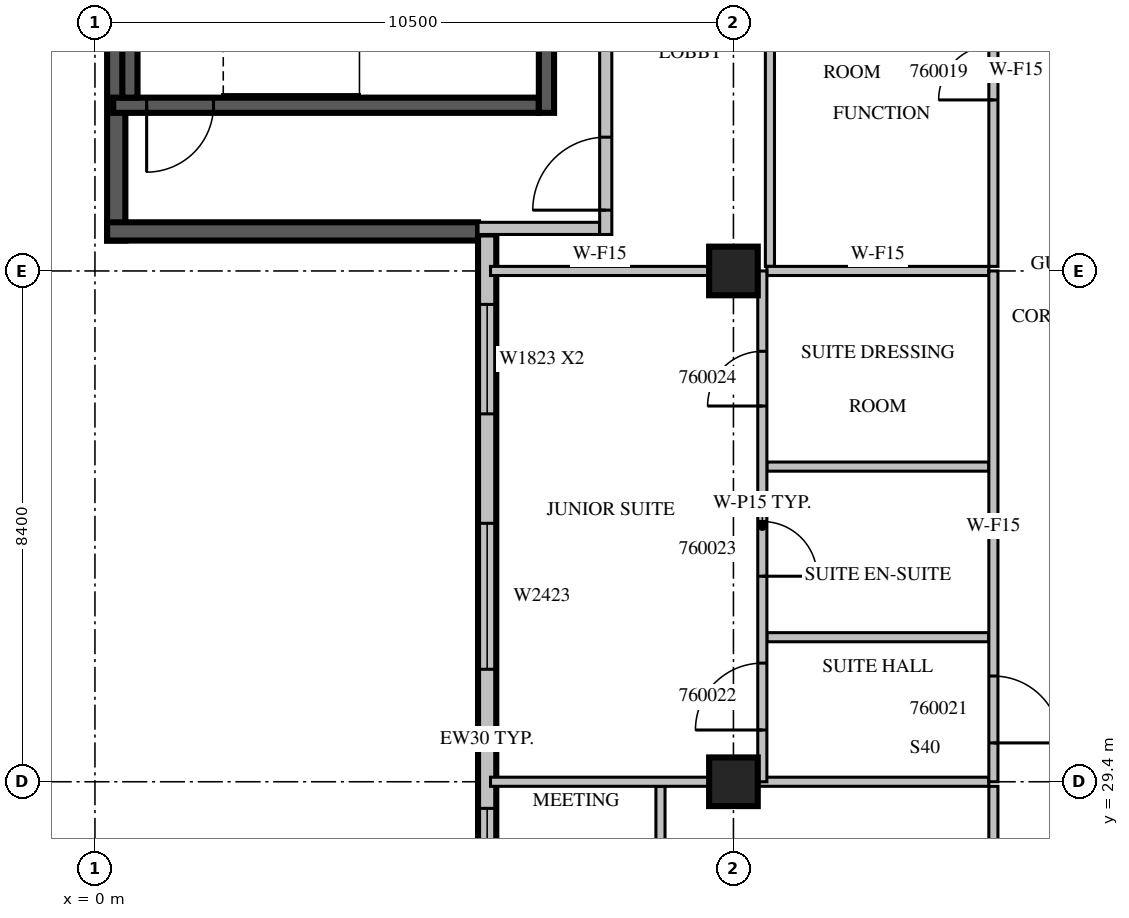
"""IFC4 building model, lengths in metres.
Left out: names, types, materials, properties, quantities, classifications, styles, units other than length and angle.
Written with IfcOpenShell. Run it as: python <this file> out.ifc"""

import sys

from ifc_helpers import new_model, si_unit, direction, frame, frame_2d, origin, origin_2d, place, context, subcontext, project, spatial, rectangle, extrude, source, transform, mapped, element, fill, save


model = new_model("IFC4")
c1 = context("Model", 3, precision=1e-05, world=origin(), true_north=direction((0.0, 1.0)))
c2 = subcontext(c1, "Body", "Model", "MODEL_VIEW")
j1 = project(units=[si_unit("LENGTHUNIT", "METRE"), si_unit("PLANEANGLEUNIT", "RADIAN")], contexts=[c1])
p1 = place(None, origin())
s1 = spatial("IfcSite", under=j1, at=p1, CompositionType="ELEMENT")
p2 = place(p1, origin())
s2 = spatial("IfcBuilding", under=s1, at=p2, CompositionType="ELEMENT")
p3 = place(p2, frame((0.0, 0.0, 261.4)))
s3 = spatial("IfcBuildingStorey", under=s2, at=p3, CompositionType="ELEMENT", Elevation=261.4)
m1 = source(origin(), c2, "Body", "SweptSolid", [
    extrude(rectangle(XDim=0.8, YDim=0.8, at=origin_2d()), origin(), (0.0, 0.0, 1.0), 3.8),
])
for number, where, z_axis, x_axis in (
    (1, (10.5, 29.4, 0.0), (0.0, 0.0, 1.0), (1.0, 0.0, 0.0)),
    (2, (10.5, 37.8, 0.0), (0.0, 0.0, 1.0), (1.0, 0.0, 0.0)),
):
    element("IfcColumn", number, at=place(p3, frame(where, z_axis=z_axis, x_axis=x_axis)), inside=s3, PredefinedType="COLUMN", context=c2, shape_type="MappedRepresentation", body=[
        mapped(m1, transform((0.0, 0.0, 0.0), scale=1.0)),
    ])
m2 = source(origin(), c2, "Body", "SweptSolid", [
    extrude(rectangle(XDim=5.65, YDim=0.3, at=frame_2d((2.825, 0.0))), origin(), (0.0, 0.0, 1.0), 3.4),
])
p4 = place(p3, frame((0.35, 43.95, 0.0), z_axis=(0.0, 0.0, 1.0), x_axis=(0.0, -1.0, 0.0)))
e3 = element("IfcWall", 3, at=p4, inside=s3, PredefinedType="SOLIDWALL", context=c2, shape_type="MappedRepresentation", body=[
    mapped(m2, transform((0.0, 0.0, 0.0), scale=1.0)),
])
m3 = source(origin(), c2, "Body", "SweptSolid", [
    extrude(rectangle(XDim=6.1, YDim=0.3, at=frame_2d((3.05, 0.0))), origin(), (0.0, 0.0, 1.0), 3.4),
])
p5 = place(p3, frame((0.2, 38.45, 0.0), z_axis=(0.0, 0.0, 1.0), x_axis=(1.0, 0.0, 0.0)))
e4 = element("IfcWall", 4, at=p5, inside=s3, PredefinedType="SOLIDWALL", context=c2, shape_type="MappedRepresentation", body=[
    mapped(m3, transform((0.0, 0.0, 0.0), scale=1.0)),
])
m4 = source(origin(), c2, "Body", "SweptSolid", [
    extrude(rectangle(XDim=16.6, YDim=0.3, at=frame_2d((8.3, 0.0))), origin(), (0.0, 0.0, 1.0), 3.4),
])
p6 = place(p3, frame((6.45, 38.4, 0.0), z_axis=(0.0, 0.0, 1.0), x_axis=(0.0, -1.0, 0.0)))
e5 = element("IfcWall", 5, at=p6, inside=s3, PredefinedType="STANDARD", context=c2, shape_type="MappedRepresentation", body=[
    mapped(m4, transform((0.0, 0.0, 0.0), scale=1.0)),
])
m5 = source(origin(), c2, "Body", "SweptSolid", [
    extrude(rectangle(XDim=1.8, YDim=2.3, at=frame_2d((0.9, 1.15))), frame((0.0, 0.16, 0.0), z_axis=(0.0, -1.0, 0.0), x_axis=(1.0, 0.0, 0.0)), (0.0, 0.0, 1.0), 0.32),
])
p7 = place(p6, frame((1.15, 0.0, 0.6)))
e6 = element("IfcOpeningElement", 6, at=p7, cuts=e5, PredefinedType="OPENING", context=c2, shape_type="MappedRepresentation", body=[
    mapped(m5, transform((0.0, 0.0, 0.0), scale=1.0)),
])
m6 = source(origin(), c2, "Body", "SweptSolid", [
    extrude(rectangle(XDim=2.4, YDim=2.3, at=frame_2d((1.2, 1.15))), frame((0.0, 0.16, 0.0), z_axis=(0.0, -1.0, 0.0), x_axis=(1.0, 0.0, 0.0)), (0.0, 0.0, 1.0), 0.32),
])
p8 = place(p6, frame((4.75, 0.0, 0.6)))
e7 = element("IfcOpeningElement", 7, at=p8, cuts=e5, PredefinedType="OPENING", context=c2, shape_type="MappedRepresentation", body=[
    mapped(m6, transform((0.0, 0.0, 0.0), scale=1.0)),
])
p9 = place(p6, frame((9.438, 0.0, 0.6)))
e8 = element("IfcOpeningElement", 8, at=p9, cuts=e5, PredefinedType="OPENING", context=c2, shape_type="MappedRepresentation", body=[
    mapped(m5, transform((0.0, 0.0, 0.0), scale=1.0)),
])
m7 = source(origin(), c2, "Body", "SweptSolid", [
    extrude(rectangle(XDim=3.0, YDim=2.3, at=frame_2d((1.5, 1.15))), frame((0.0, 0.16, 0.0), z_axis=(0.0, -1.0, 0.0), x_axis=(1.0, 0.0, 0.0)), (0.0, 0.0, 1.0), 0.32),
])
p10 = place(p6, frame((12.7, 0.0, 0.6)))
e9 = element("IfcOpeningElement", 9, at=p10, cuts=e5, PredefinedType="OPENING", context=c2, shape_type="MappedRepresentation", body=[
    mapped(m7, transform((0.0, 0.0, 0.0), scale=1.0)),
])
m8 = source(origin(), c2, "Body", "SweptSolid", [
    extrude(rectangle(XDim=7.0, YDim=0.25, at=frame_2d((3.5, 0.0))), origin(), (0.0, 0.0, 1.0), 3.4),
])
p11 = place(p3, frame((0.3, 40.525, 0.0), z_axis=(0.0, 0.0, 1.0), x_axis=(1.0, 0.0, 0.0)))
e10 = element("IfcWall", 10, at=p11, inside=s3, PredefinedType="SOLIDWALL", context=c2, shape_type="MappedRepresentation", body=[
    mapped(m8, transform((0.0, 0.0, 0.0), scale=1.0)),
])
m9 = source(origin(), c2, "Body", "SweptSolid", [
    extrude(rectangle(XDim=1.1, YDim=2.1, at=frame_2d((0.55, 1.05))), frame((0.0, 0.135, 0.0), z_axis=(0.0, -1.0, 0.0), x_axis=(1.0, 0.0, 0.0)), (0.0, 0.0, 1.0), 0.27),
])
p12 = place(p11, frame((0.55, 0.0, 0.0)))
e11 = element("IfcOpeningElement", 11, at=p12, cuts=e10, PredefinedType="OPENING", context=c2, shape_type="MappedRepresentation", body=[
    mapped(m9, transform((0.0, 0.0, 0.0), scale=1.0)),
])
m10 = source(origin(), c2, "Body", "SweptSolid", [
    extrude(rectangle(XDim=3.45, YDim=0.25, at=frame_2d((1.725, 0.0))), origin(), (0.0, 0.0, 1.0), 3.4),
])
p13 = place(p3, frame((7.425, 40.4, 0.0), z_axis=(0.0, 0.0, 1.0), x_axis=(0.0, 1.0, 0.0)))
e12 = element("IfcWall", 12, at=p13, inside=s3, PredefinedType="SOLIDWALL", context=c2, shape_type="MappedRepresentation", body=[
    mapped(m10, transform((0.0, 0.0, 0.0), scale=1.0)),
])
m11 = source(origin(), c2, "Body", "SweptSolid", [
    extrude(rectangle(XDim=2.95, YDim=0.25, at=frame_2d((1.475, 0.0))), origin(), (0.0, 0.0, 1.0), 3.4),
])
p14 = place(p3, frame((0.575, 40.65, 0.0), z_axis=(0.0, 0.0, 1.0), x_axis=(0.0, 1.0, 0.0)))
e13 = element("IfcWall", 13, at=p14, inside=s3, PredefinedType="SOLIDWALL", context=c2, shape_type="MappedRepresentation", body=[
    mapped(m11, transform((0.0, 0.0, 0.0), scale=1.0)),
])
m12 = source(origin(), c2, "Body", "SweptSolid", [
    extrude(rectangle(XDim=2.0, YDim=0.2, at=frame_2d((1.0, 0.0))), origin(), (0.0, 0.0, 1.0), 3.4),
])
p15 = place(p3, frame((6.3, 38.5, 0.0), z_axis=(0.0, 0.0, 1.0), x_axis=(1.0, 0.0, 0.0)))
e14 = element("IfcWall", 14, at=p15, inside=s3, PredefinedType="PARTITIONING", context=c2, shape_type="MappedRepresentation", body=[
    mapped(m12, transform((0.0, 0.0, 0.0), scale=1.0)),
])
m13 = source(origin(), c2, "Body", "SweptSolid", [
    extrude(rectangle(XDim=5.45, YDim=0.2, at=frame_2d((2.725, 0.0))), origin(), (0.0, 0.0, 1.0), 3.4),
])
p16 = place(p3, frame((8.4, 38.4, 0.0), z_axis=(0.0, 0.0, 1.0), x_axis=(0.0, 1.0, 0.0)))
e15 = element("IfcWall", 15, at=p16, inside=s3, PredefinedType="PARTITIONING", context=c2, shape_type="MappedRepresentation", body=[
    mapped(m13, transform((0.0, 0.0, 0.0), scale=1.0)),
])
m14 = source(origin(), c2, "Body", "SweptSolid", [
    extrude(rectangle(XDim=1.2, YDim=2.1, at=frame_2d((0.6, 1.05))), frame((0.0, 0.11, 0.0), z_axis=(0.0, -1.0, 0.0), x_axis=(1.0, 0.0, 0.0)), (0.0, 0.0, 1.0), 0.22),
])
p17 = place(p16, frame((0.4, 0.0, 0.0)))
e16 = element("IfcOpeningElement", 16, at=p17, cuts=e15, PredefinedType="OPENING", context=c2, shape_type="MappedRepresentation", body=[
    mapped(m14, transform((0.0, 0.0, 0.0), scale=1.0)),
])
m15 = source(origin(), c2, "Body", "SweptSolid", [
    extrude(rectangle(XDim=0.9, YDim=2.1, at=frame_2d((0.45, 1.05))), frame((0.0, 0.11, 0.0), z_axis=(0.0, -1.0, 0.0), x_axis=(1.0, 0.0, 0.0)), (0.0, 0.0, 1.0), 0.22),
])
p18 = place(p16, frame((3.25, 0.0, 0.0)))
e17 = element("IfcOpeningElement", 17, at=p18, cuts=e15, PredefinedType="OPENING", context=c2, shape_type="MappedRepresentation", body=[
    mapped(m15, transform((0.0, 0.0, 0.0), scale=1.0)),
])
m16 = source(origin(), c2, "Body", "SweptSolid", [
    extrude(rectangle(XDim=3.25, YDim=0.15, at=frame_2d((1.625, 0.0))), origin(), (0.0, 0.0, 1.0), 3.4),
])
for number, where, z_axis, x_axis in (
    (18, (9.3, 26.075, 0.0), (0.0, 0.0, 1.0), (0.0, 1.0, 0.0)),
    (19, (14.775, 26.075, 0.0), (0.0, 0.0, 1.0), (0.0, 1.0, 0.0)),
):
    element("IfcWall", number, at=place(p3, frame(where, z_axis=z_axis, x_axis=x_axis)), inside=s3, PredefinedType="PARTITIONING", context=c2, shape_type="MappedRepresentation", body=[
        mapped(m16, transform((0.0, 0.0, 0.0), scale=1.0)),
    ])
m17 = source(origin(), c2, "Body", "SweptSolid", [
    extrude(rectangle(XDim=3.596, YDim=0.15, at=frame_2d((1.798, 0.0))), origin(), (0.0, 0.0, 1.0), 3.4),
])
p19 = place(p3, frame((10.101, 29.4, 0.0), z_axis=(0.0, 0.0, 1.0), x_axis=(-1.0, 0.0, 0.0)))
e20 = element("IfcWall", 20, at=p19, inside=s3, PredefinedType="PARTITIONING", context=c2, shape_type="MappedRepresentation", body=[
    mapped(m17, transform((0.0, 0.0, 0.0), scale=1.0)),
])
m18 = source(origin(), c2, "Body", "SweptSolid", [
    extrude(rectangle(XDim=3.801, YDim=0.15, at=frame_2d((1.901, 0.0))), origin(), (0.0, 0.0, 1.0), 3.4),
])
p20 = place(p3, frame((14.7, 29.4, 0.0), z_axis=(0.0, 0.0, 1.0), x_axis=(-1.0, 0.0, 0.0)))
e21 = element("IfcWall", 21, at=p20, inside=s3, PredefinedType="PARTITIONING", context=c2, shape_type="MappedRepresentation", body=[
    mapped(m18, transform((0.0, 0.0, 0.0), scale=1.0)),
])
m19 = source(origin(), c2, "Body", "SweptSolid", [
    extrude(rectangle(XDim=6.45, YDim=0.15, at=frame_2d((3.225, 0.0))), origin(), (0.0, 0.0, 1.0), 3.4),
])
p21 = place(p3, frame((11.1, 44.325, 0.0), z_axis=(0.0, 0.0, 1.0), x_axis=(0.0, -1.0, 0.0)))
e22 = element("IfcWall", 22, at=p21, inside=s3, PredefinedType="PARTITIONING", context=c2, shape_type="MappedRepresentation", body=[
    mapped(m19, transform((0.0, 0.0, 0.0), scale=1.0)),
])
p22 = place(p3, frame((14.775, 37.875, 0.0), z_axis=(0.0, 0.0, 1.0), x_axis=(0.0, 1.0, 0.0)))
e23 = element("IfcWall", 23, at=p22, inside=s3, PredefinedType="PARTITIONING", context=c2, shape_type="MappedRepresentation", body=[
    mapped(m19, transform((0.0, 0.0, 0.0), scale=1.0)),
])
m20 = source(origin(), c2, "Body", "SweptSolid", [
    extrude(rectangle(XDim=0.9, YDim=2.1, at=frame_2d((0.45, 1.05))), frame((0.0, 0.085, 0.0), z_axis=(0.0, -1.0, 0.0), x_axis=(1.0, 0.0, 0.0)), (0.0, 0.0, 1.0), 0.17),
])
p23 = place(p22, frame((2.737, 0.0, 0.0)))
e24 = element("IfcOpeningElement", 24, at=p23, cuts=e23, PredefinedType="OPENING", context=c2, shape_type="MappedRepresentation", body=[
    mapped(m20, transform((0.0, 0.0, 0.0), scale=1.0)),
])
m21 = source(origin(), c2, "Body", "SweptSolid", [
    extrude(rectangle(XDim=3.65, YDim=0.15, at=frame_2d((1.825, 0.0))), origin(), (0.0, 0.0, 1.0), 3.4),
])
for number, where, z_axis, x_axis in (
    (25, (14.7, 31.777, 0.0), (0.0, 0.0, 1.0), (-1.0, 0.0, 0.0)),
    (26, (14.7, 34.583, 0.0), (0.0, 0.0, 1.0), (-1.0, 0.0, 0.0)),
):
    element("IfcWall", number, at=place(p3, frame(where, z_axis=z_axis, x_axis=x_axis)), inside=s3, PredefinedType="PARTITIONING", context=c2, shape_type="MappedRepresentation", body=[
        mapped(m21, transform((0.0, 0.0, 0.0), scale=1.0)),
    ])
p24 = place(p3, frame((10.101, 37.8, 0.0), z_axis=(0.0, 0.0, 1.0), x_axis=(-1.0, 0.0, 0.0)))
e27 = element("IfcWall", 27, at=p24, inside=s3, PredefinedType="PARTITIONING", context=c2, shape_type="MappedRepresentation", body=[
    mapped(m17, transform((0.0, 0.0, 0.0), scale=1.0)),
])
p25 = place(p3, frame((14.7, 37.8, 0.0), z_axis=(0.0, 0.0, 1.0), x_axis=(-1.0, 0.0, 0.0)))
e28 = element("IfcWall", 28, at=p25, inside=s3, PredefinedType="PARTITIONING", context=c2, shape_type="MappedRepresentation", body=[
    mapped(m21, transform((0.0, 0.0, 0.0), scale=1.0)),
])
m22 = source(origin(), c2, "Body", "SweptSolid", [
    extrude(rectangle(XDim=8.4, YDim=0.15, at=frame_2d((4.2, 0.0))), origin(), (0.0, 0.0, 1.0), 3.4),
])
p26 = place(p3, frame((10.975, 29.4, 0.0), z_axis=(0.0, 0.0, 1.0), x_axis=(0.0, 1.0, 0.0)))
e29 = element("IfcWall", 29, at=p26, inside=s3, PredefinedType="PARTITIONING", context=c2, shape_type="MappedRepresentation", body=[
    mapped(m22, transform((0.0, 0.0, 0.0), scale=1.0)),
])
m23 = source(origin(), c2, "Body", "SweptSolid", [
    extrude(rectangle(XDim=1.1, YDim=2.1, at=frame_2d((0.55, 1.05))), frame((0.0, 0.085, 0.0), z_axis=(0.0, -1.0, 0.0), x_axis=(1.0, 0.0, 0.0)), (0.0, 0.0, 1.0), 0.17),
])
p27 = place(p26, frame((0.851, 0.0, 0.0)))
e30 = element("IfcOpeningElement", 30, at=p27, cuts=e29, PredefinedType="OPENING", context=c2, shape_type="MappedRepresentation", body=[
    mapped(m23, transform((0.0, 0.0, 0.0), scale=1.0)),
])
p28 = place(p26, frame((3.38, 0.0, 0.0)))
e31 = element("IfcOpeningElement", 31, at=p28, cuts=e29, PredefinedType="OPENING", context=c2, shape_type="MappedRepresentation", body=[
    mapped(m20, transform((0.0, 0.0, 0.0), scale=1.0)),
])
p29 = place(p26, frame((6.179, 0.0, 0.0)))
e32 = element("IfcOpeningElement", 32, at=p29, cuts=e29, PredefinedType="OPENING", context=c2, shape_type="MappedRepresentation", body=[
    mapped(m20, transform((0.0, 0.0, 0.0), scale=1.0)),
])
p30 = place(p3, frame((14.775, 29.4, 0.0), z_axis=(0.0, 0.0, 1.0), x_axis=(0.0, 1.0, 0.0)))
e33 = element("IfcWall", 33, at=p30, inside=s3, PredefinedType="PARTITIONING", context=c2, shape_type="MappedRepresentation", body=[
    mapped(m22, transform((0.0, 0.0, 0.0), scale=1.0)),
])
p31 = place(p30, frame((0.638, 0.0, 0.0)))
e34 = element("IfcOpeningElement", 34, at=p31, cuts=e33, PredefinedType="OPENING", context=c2, shape_type="MappedRepresentation", body=[
    mapped(m23, transform((0.0, 0.0, 0.0), scale=1.0)),
])
m24 = source(origin(), c2, "Body", "SweptSolid", [
    extrude(rectangle(XDim=1.8, YDim=2.3, at=frame_2d((0.9, 1.15))), frame((0.0, 0.03, 0.0), z_axis=(0.0, -1.0, 0.0), x_axis=(1.0, 0.0, 0.0)), (0.0, 0.0, 1.0), 0.06),
])
p32 = place(p7, origin())
e35 = element("IfcWindow", 35, at=p32, inside=s3, PartitioningType="SINGLE_PANEL", PredefinedType="WINDOW", context=c2, shape_type="MappedRepresentation", body=[
    mapped(m24, transform((0.0, 0.0, 0.0), scale=1.0)),
])
fill(e6, e35)
m25 = source(origin(), c2, "Body", "SweptSolid", [
    extrude(rectangle(XDim=2.4, YDim=2.3, at=frame_2d((1.2, 1.15))), frame((0.0, 0.03, 0.0), z_axis=(0.0, -1.0, 0.0), x_axis=(1.0, 0.0, 0.0)), (0.0, 0.0, 1.0), 0.06),
])
p33 = place(p8, origin())
e36 = element("IfcWindow", 36, at=p33, inside=s3, PartitioningType="SINGLE_PANEL", PredefinedType="WINDOW", context=c2, shape_type="MappedRepresentation", body=[
    mapped(m25, transform((0.0, 0.0, 0.0), scale=1.0)),
])
fill(e7, e36)
p34 = place(p9, origin())
e37 = element("IfcWindow", 37, at=p34, inside=s3, PartitioningType="SINGLE_PANEL", PredefinedType="WINDOW", context=c2, shape_type="MappedRepresentation", body=[
    mapped(m24, transform((0.0, 0.0, 0.0), scale=1.0)),
])
fill(e8, e37)
m26 = source(origin(), c2, "Body", "SweptSolid", [
    extrude(rectangle(XDim=1.1, YDim=2.1, at=frame_2d((0.55, 1.05))), frame((0.0, 0.025, 0.0), z_axis=(0.0, -1.0, 0.0), x_axis=(1.0, 0.0, 0.0)), (0.0, 0.0, 1.0), 0.05),
])
p35 = place(p12, origin())
e38 = element("IfcDoor", 38, at=p35, inside=s3, OperationType="SINGLE_SWING_RIGHT", PredefinedType="DOOR", context=c2, shape_type="MappedRepresentation", body=[
    mapped(m26, transform((0.0, 0.0, 0.0), scale=1.0)),
])
fill(e11, e38)
m27 = source(origin(), c2, "Body", "SweptSolid", [
    extrude(rectangle(XDim=1.2, YDim=2.1, at=frame_2d((0.6, 1.05))), frame((0.0, 0.025, 0.0), z_axis=(0.0, -1.0, 0.0), x_axis=(1.0, 0.0, 0.0)), (0.0, 0.0, 1.0), 0.05),
])
p36 = place(p17, origin())
e39 = element("IfcDoor", 39, at=p36, inside=s3, OperationType="SINGLE_SWING_LEFT", PredefinedType="DOOR", context=c2, shape_type="MappedRepresentation", body=[
    mapped(m27, transform((0.0, 0.0, 0.0), scale=1.0)),
])
fill(e16, e39)
m28 = source(origin(), c2, "Body", "SweptSolid", [
    extrude(rectangle(XDim=0.9, YDim=2.1, at=frame_2d((0.45, 1.05))), frame((0.0, 0.025, 0.0), z_axis=(0.0, -1.0, 0.0), x_axis=(1.0, 0.0, 0.0)), (0.0, 0.0, 1.0), 0.05),
])
p37 = place(p23, origin())
e40 = element("IfcDoor", 40, at=p37, inside=s3, OperationType="SINGLE_SWING_LEFT", PredefinedType="DOOR", context=c2, shape_type="MappedRepresentation", body=[
    mapped(m28, transform((0.0, 0.0, 0.0), scale=1.0)),
])
fill(e24, e40)
p38 = place(p31, origin())
e41 = element("IfcDoor", 41, at=p38, inside=s3, OperationType="SINGLE_SWING_RIGHT", PredefinedType="DOOR", context=c2, shape_type="MappedRepresentation", body=[
    mapped(m26, transform((0.0, 0.0, 0.0), scale=1.0)),
])
fill(e34, e41)
p39 = place(p27, origin())
e42 = element("IfcDoor", 42, at=p39, inside=s3, OperationType="SINGLE_SWING_LEFT", PredefinedType="DOOR", context=c2, shape_type="MappedRepresentation", body=[
    mapped(m26, transform((0.0, 0.0, 0.0), scale=1.0)),
])
fill(e30, e42)
p40 = place(p28, origin())
e43 = element("IfcDoor", 43, at=p40, inside=s3, OperationType="SINGLE_SWING_RIGHT", PredefinedType="DOOR", context=c2, shape_type="MappedRepresentation", body=[
    mapped(m28, transform((0.0, 0.0, 0.0), scale=1.0)),
])
fill(e31, e43)
p41 = place(p29, origin())
e44 = element("IfcDoor", 44, at=p41, inside=s3, OperationType="SINGLE_SWING_LEFT", PredefinedType="DOOR", context=c2, shape_type="MappedRepresentation", body=[
    mapped(m28, transform((0.0, 0.0, 0.0), scale=1.0)),
])
fill(e32, e44)
save(model, sys.argv[1])
